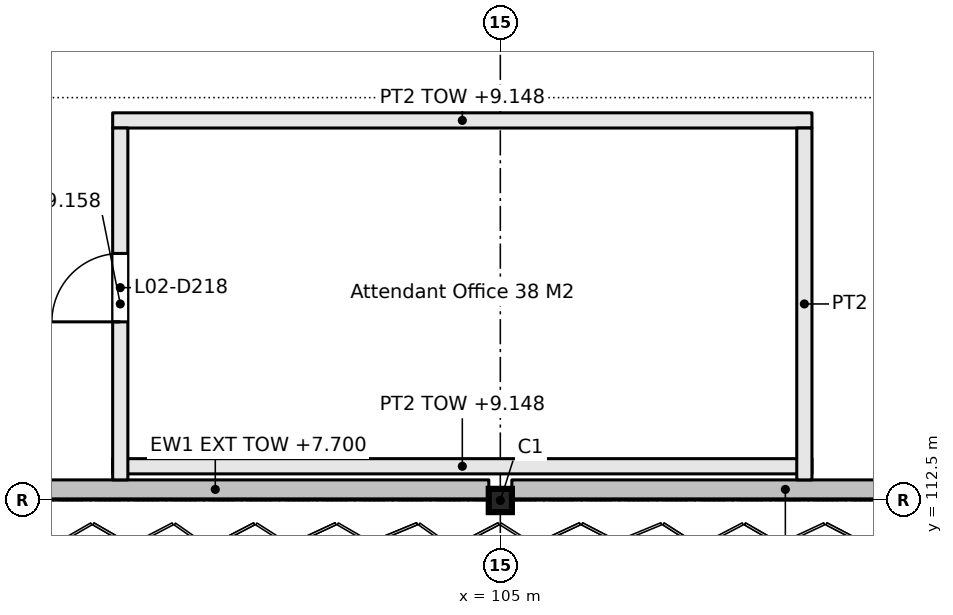
"""IFC4 building model, lengths in metres.
Left out: names, types, materials, properties, quantities, classifications, styles, units other than length and angle.
Written with IfcOpenShell. Run it as: python <this file> out.ifc"""

import sys

from ifc_helpers import new_model, si_unit, direction, frame, frame_2d, origin, origin_2d, place, context, subcontext, project, spatial, rectangle, i_section, extrude, element, fill, save


model = new_model("IFC4")
c1 = context("Model", 3, precision=1e-05, world=origin(), true_north=direction((0.0, 1.0)))
c2 = subcontext(c1, "Body", "Model", "MODEL_VIEW")
j1 = project(units=[si_unit("LENGTHUNIT", "METRE"), si_unit("PLANEANGLEUNIT", "RADIAN")], contexts=[c1])
p1 = place(None, origin())
s1 = spatial("IfcSite", under=j1, at=p1, CompositionType="ELEMENT")
p2 = place(p1, origin())
s2 = spatial("IfcBuilding", under=s1, at=p2, CompositionType="ELEMENT")
p3 = place(p2, frame((0.0, 0.0, 6.6)))
s3 = spatial("IfcBuildingStorey", under=s2, at=p3, CompositionType="ELEMENT", Elevation=6.6)
p4 = place(p3, frame((105.0, 112.5, 0.0), z_axis=(0.0, 0.0, 1.0), x_axis=(1.0, 0.0, 0.0)))
e1 = element("IfcColumn", 1, at=p4, inside=s3, PredefinedType="COLUMN", context=c2, shape_type="SweptSolid", body=[
    extrude(i_section(OverallWidth=0.305, OverallDepth=0.307, WebThickness=0.01, FlangeThickness=0.015, FilletRadius=0.015, at=origin_2d()), origin(), (0.0, 0.0, 1.0), 3.3),
])
for number, where, z_axis, x_axis in (
    (2, (99.9, 112.95, 0.0), (0.0, 0.0, 1.0), (1.0, 0.0, 0.0)),
    (3, (99.9, 117.5, 0.0), (0.0, 0.0, 1.0), (1.0, 0.0, 0.0)),
):
    element("IfcWall", number, at=place(p3, frame(where, z_axis=z_axis, x_axis=x_axis)), inside=s3, PredefinedType="PARTITIONING", context=c2, shape_type="SweptSolid", body=[
        extrude(rectangle(XDim=9.2, YDim=0.2, at=frame_2d((4.6, 0.0))), origin(), (0.0, 0.0, 1.0), 2.548),
    ])
p5 = place(p3, frame((100.0, 112.771, 0.0), z_axis=(0.0, 0.0, 1.0), x_axis=(0.0, 1.0, 0.0)))
e4 = element("IfcWall", 4, at=p5, inside=s3, PredefinedType="PARTITIONING", context=c2, shape_type="SweptSolid", body=[
    extrude(rectangle(XDim=4.629, YDim=0.2, at=frame_2d((2.314, 0.0))), origin(), (0.0, 0.0, 1.0), 2.558),
])
p6 = place(p5, frame((2.079, 0.0, 0.0)))
e5 = element("IfcOpeningElement", 5, at=p6, cuts=e4, PredefinedType="OPENING", context=c2, shape_type="SweptSolid", body=[
    extrude(rectangle(XDim=0.9, YDim=2.1, at=frame_2d((0.45, 1.05))), frame((0.0, 0.11, 0.0), z_axis=(0.0, -1.0, 0.0), x_axis=(1.0, 0.0, 0.0)), (0.0, 0.0, 1.0), 0.22),
])
p7 = place(p3, frame((109.0, 112.771, 0.0), z_axis=(0.0, 0.0, 1.0), x_axis=(0.0, 1.0, 0.0)))
e6 = element("IfcWall", 6, at=p7, inside=s3, PredefinedType="PARTITIONING", context=c2, shape_type="SweptSolid", body=[
    extrude(rectangle(XDim=4.629, YDim=0.2, at=frame_2d((2.314, 0.0))), origin(), (0.0, 0.0, 1.0), 2.41),
])
for number, where, z_axis, x_axis in (
    (7, (97.652, 112.646, 0.0), (0.0, 0.0, 1.0), (1.0, 0.0, 0.0)),
    (8, (105.152, 112.646, 0.0), (0.0, 0.0, 1.0), (1.0, 0.0, 0.0)),
):
    element("IfcWall", number, at=place(p3, frame(where, z_axis=z_axis, x_axis=x_axis)), inside=s3, PredefinedType="SOLIDWALL", context=c2, shape_type="SweptSolid", body=[
        extrude(rectangle(XDim=7.197, YDim=0.25, at=frame_2d((3.598, 0.0))), origin(), (0.0, 0.0, 1.0), 1.1),
    ])
p8 = place(p6, origin())
e9 = element("IfcDoor", 9, at=p8, inside=s3, OperationType="SINGLE_SWING_RIGHT", PredefinedType="DOOR", context=c2, shape_type="SweptSolid", body=[
    extrude(rectangle(XDim=0.9, YDim=2.1, at=frame_2d((0.45, 1.05))), frame((0.0, 0.025, 0.0), z_axis=(0.0, -1.0, 0.0), x_axis=(1.0, 0.0, 0.0)), (0.0, 0.0, 1.0), 0.05),
])
fill(e5, e9)
save(model, sys.argv[1])
